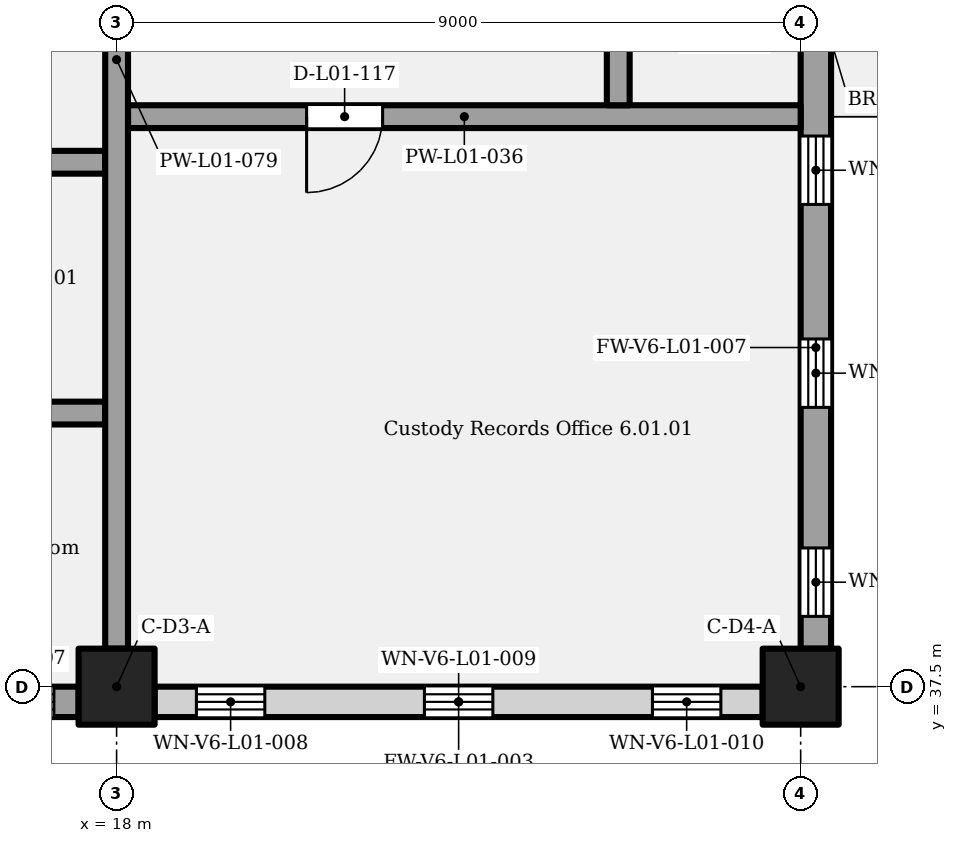
"""IFC4 building model, lengths in metres.
Left out: names, types, materials, properties, quantities, classifications, styles, units other than length and angle.
Written with IfcOpenShell. Run it as: python <this file> out.ifc"""

import sys

from ifc_helpers import new_model, si_unit, direction, frame, frame_2d, origin, origin_2d, place, context, subcontext, project, spatial, rectangle, extrude, element, fill, save


model = new_model("IFC4")
c1 = context("Model", 3, precision=1e-05, world=origin(), true_north=direction((0.0, 1.0)))
c2 = subcontext(c1, "Body", "Model", "MODEL_VIEW")
j1 = project(units=[si_unit("LENGTHUNIT", "METRE"), si_unit("PLANEANGLEUNIT", "RADIAN")], contexts=[c1])
p1 = place(None, origin())
s1 = spatial("IfcSite", under=j1, at=p1, CompositionType="ELEMENT")
p2 = place(p1, origin())
s2 = spatial("IfcBuilding", under=s1, at=p2, CompositionType="ELEMENT")
p3 = place(p2, frame((0.0, 0.0, 6.6)))
s3 = spatial("IfcBuildingStorey", under=s2, at=p3, CompositionType="ELEMENT", Elevation=6.6)
for number, where, z_axis, x_axis in (
    (1, (18.0, 37.5, 0.0), (0.0, 0.0, 1.0), (1.0, 0.0, 0.0)),
    (2, (27.0, 37.5, 0.0), (0.0, 0.0, 1.0), (1.0, 0.0, 0.0)),
):
    element("IfcColumn", number, at=place(p3, frame(where, z_axis=z_axis, x_axis=x_axis)), inside=s3, PredefinedType="COLUMN", context=c2, shape_type="SweptSolid", body=[
        extrude(rectangle(XDim=1.0, YDim=1.0, at=origin_2d()), origin(), (0.0, 0.0, 1.0), 5.4),
    ])
p4 = place(p3, frame((9.5, 37.3, 0.0), z_axis=(0.0, 0.0, 1.0), x_axis=(1.0, 0.0, 0.0)))
e3 = element("IfcWall", 3, at=p4, inside=s3, PredefinedType="SOLIDWALL", context=c2, shape_type="SweptSolid", body=[
    extrude(rectangle(XDim=8.0, YDim=0.4, at=frame_2d((4.0, 0.0))), origin(), (0.0, 0.0, 1.0), 5.1),
])
p5 = place(p4, frame((0.325, 0.0, 1.5)))
e4 = element("IfcOpeningElement", 4, at=p5, cuts=e3, PredefinedType="OPENING", context=c2, shape_type="SweptSolid", body=[
    extrude(rectangle(XDim=0.6, YDim=3.0, at=frame_2d((0.3, 1.5))), frame((0.0, 0.21, 0.0), z_axis=(0.0, -1.0, 0.0), x_axis=(1.0, 0.0, 0.0)), (0.0, 0.0, 1.0), 0.42),
])
p6 = place(p4, frame((2.575, 0.0, 1.5)))
e5 = element("IfcOpeningElement", 5, at=p6, cuts=e3, PredefinedType="OPENING", context=c2, shape_type="SweptSolid", body=[
    extrude(rectangle(XDim=0.6, YDim=3.0, at=frame_2d((0.3, 1.5))), frame((0.0, 0.21, 0.0), z_axis=(0.0, -1.0, 0.0), x_axis=(1.0, 0.0, 0.0)), (0.0, 0.0, 1.0), 0.42),
])
p7 = place(p4, frame((4.825, 0.0, 1.5)))
e6 = element("IfcOpeningElement", 6, at=p7, cuts=e3, PredefinedType="OPENING", context=c2, shape_type="SweptSolid", body=[
    extrude(rectangle(XDim=0.6, YDim=3.0, at=frame_2d((0.3, 1.5))), frame((0.0, 0.21, 0.0), z_axis=(0.0, -1.0, 0.0), x_axis=(1.0, 0.0, 0.0)), (0.0, 0.0, 1.0), 0.42),
])
p8 = place(p4, frame((7.075, 0.0, 1.5)))
e7 = element("IfcOpeningElement", 7, at=p8, cuts=e3, PredefinedType="OPENING", context=c2, shape_type="SweptSolid", body=[
    extrude(rectangle(XDim=0.6, YDim=3.0, at=frame_2d((0.3, 1.5))), frame((0.0, 0.21, 0.0), z_axis=(0.0, -1.0, 0.0), x_axis=(1.0, 0.0, 0.0)), (0.0, 0.0, 1.0), 0.42),
])
p9 = place(p3, frame((18.5, 37.3, 0.0), z_axis=(0.0, 0.0, 1.0), x_axis=(1.0, 0.0, 0.0)))
e8 = element("IfcWall", 8, at=p9, inside=s3, PredefinedType="SOLIDWALL", context=c2, shape_type="SweptSolid", body=[
    extrude(rectangle(XDim=8.0, YDim=0.4, at=frame_2d((4.0, 0.0))), origin(), (0.0, 0.0, 1.0), 5.1),
])
p10 = place(p9, frame((0.55, 0.0, 1.5)))
e9 = element("IfcOpeningElement", 9, at=p10, cuts=e8, PredefinedType="OPENING", context=c2, shape_type="SweptSolid", body=[
    extrude(rectangle(XDim=0.9, YDim=1.8, at=frame_2d((0.45, 0.9))), frame((0.0, 0.21, 0.0), z_axis=(0.0, -1.0, 0.0), x_axis=(1.0, 0.0, 0.0)), (0.0, 0.0, 1.0), 0.42),
])
p11 = place(p9, frame((3.55, 0.0, 1.5)))
e10 = element("IfcOpeningElement", 10, at=p11, cuts=e8, PredefinedType="OPENING", context=c2, shape_type="SweptSolid", body=[
    extrude(rectangle(XDim=0.9, YDim=1.8, at=frame_2d((0.45, 0.9))), frame((0.0, 0.21, 0.0), z_axis=(0.0, -1.0, 0.0), x_axis=(1.0, 0.0, 0.0)), (0.0, 0.0, 1.0), 0.42),
])
p12 = place(p9, frame((6.55, 0.0, 1.5)))
e11 = element("IfcOpeningElement", 11, at=p12, cuts=e8, PredefinedType="OPENING", context=c2, shape_type="SweptSolid", body=[
    extrude(rectangle(XDim=0.9, YDim=1.8, at=frame_2d((0.45, 0.9))), frame((0.0, 0.21, 0.0), z_axis=(0.0, -1.0, 0.0), x_axis=(1.0, 0.0, 0.0)), (0.0, 0.0, 1.0), 0.42),
])
p13 = place(p3, frame((27.2, 38.0, 0.0), z_axis=(0.0, 0.0, 1.0), x_axis=(0.0, 1.0, 0.0)))
e12 = element("IfcWall", 12, at=p13, inside=s3, PredefinedType="SOLIDWALL", context=c2, shape_type="SweptSolid", body=[
    extrude(rectangle(XDim=7.925, YDim=0.4, at=frame_2d((3.962, 0.0))), origin(), (0.0, 0.0, 1.0), 5.1),
])
p14 = place(p13, frame((0.425, 0.0, 1.5)))
e13 = element("IfcOpeningElement", 13, at=p14, cuts=e12, PredefinedType="OPENING", context=c2, shape_type="SweptSolid", body=[
    extrude(rectangle(XDim=0.9, YDim=1.8, at=frame_2d((0.45, 0.9))), frame((0.0, 0.21, 0.0), z_axis=(0.0, -1.0, 0.0), x_axis=(1.0, 0.0, 0.0)), (0.0, 0.0, 1.0), 0.42),
])
p15 = place(p13, frame((3.175, 0.0, 1.5)))
e14 = element("IfcOpeningElement", 14, at=p15, cuts=e12, PredefinedType="OPENING", context=c2, shape_type="SweptSolid", body=[
    extrude(rectangle(XDim=0.9, YDim=1.8, at=frame_2d((0.45, 0.9))), frame((0.0, 0.21, 0.0), z_axis=(0.0, -1.0, 0.0), x_axis=(1.0, 0.0, 0.0)), (0.0, 0.0, 1.0), 0.42),
])
p16 = place(p13, frame((5.845, 0.0, 1.5)))
e15 = element("IfcOpeningElement", 15, at=p16, cuts=e12, PredefinedType="OPENING", context=c2, shape_type="SweptSolid", body=[
    extrude(rectangle(XDim=0.9, YDim=1.8, at=frame_2d((0.45, 0.9))), frame((0.0, 0.21, 0.0), z_axis=(0.0, -1.0, 0.0), x_axis=(1.0, 0.0, 0.0)), (0.0, 0.0, 1.0), 0.42),
])
p17 = place(p3, frame((9.0, 41.1, 0.0), z_axis=(0.0, 0.0, 1.0), x_axis=(1.0, 0.0, 0.0)))
e16 = element("IfcWall", 16, at=p17, inside=s3, PredefinedType="PARTITIONING", context=c2, shape_type="SweptSolid", body=[
    extrude(rectangle(XDim=8.85, YDim=0.3, at=frame_2d((4.425, 0.0))), origin(), (0.0, 0.0, 1.0), 5.1),
])
p18 = place(p17, frame((1.7, 0.0, 0.0), z_axis=(0.0, 0.0, 1.0), x_axis=(-1.0, 0.0, 0.0)))
e17 = element("IfcOpeningElement", 17, at=p18, cuts=e16, PredefinedType="OPENING", context=c2, shape_type="SweptSolid", body=[
    extrude(rectangle(XDim=1.0, YDim=2.1, at=frame_2d((0.5, 1.05))), frame((0.0, 0.16, 0.0), z_axis=(0.0, -1.0, 0.0), x_axis=(1.0, 0.0, 0.0)), (0.0, 0.0, 1.0), 0.32),
])
p19 = place(p3, frame((11.55, 44.4, 0.0), z_axis=(0.0, 0.0, 1.0), x_axis=(1.0, 0.0, 0.0)))
e18 = element("IfcWall", 18, at=p19, inside=s3, PredefinedType="PARTITIONING", context=c2, shape_type="SweptSolid", body=[
    extrude(rectangle(XDim=6.3, YDim=0.3, at=frame_2d((3.15, 0.0))), origin(), (0.0, 0.0, 1.0), 5.1),
])
p20 = place(p3, frame((18.15, 45.0, 0.0), z_axis=(0.0, 0.0, 1.0), x_axis=(1.0, 0.0, 0.0)))
e19 = element("IfcWall", 19, at=p20, inside=s3, PredefinedType="PARTITIONING", context=c2, shape_type="SweptSolid", body=[
    extrude(rectangle(XDim=8.85, YDim=0.3, at=frame_2d((4.425, 0.0))), origin(), (0.0, 0.0, 1.0), 5.1),
])
p21 = place(p20, frame((3.35, 0.0, 0.0), z_axis=(0.0, 0.0, 1.0), x_axis=(-1.0, 0.0, 0.0)))
e20 = element("IfcOpeningElement", 20, at=p21, cuts=e19, PredefinedType="OPENING", context=c2, shape_type="SweptSolid", body=[
    extrude(rectangle(XDim=1.0, YDim=2.1, at=frame_2d((0.5, 1.05))), frame((0.0, 0.16, 0.0), z_axis=(0.0, -1.0, 0.0), x_axis=(1.0, 0.0, 0.0)), (0.0, 0.0, 1.0), 0.32),
])
p22 = place(p3, frame((18.0, 38.0, 0.0), z_axis=(0.0, 0.0, 1.0), x_axis=(0.0, 1.0, 0.0)))
e21 = element("IfcWall", 21, at=p22, inside=s3, PredefinedType="PARTITIONING", context=c2, shape_type="SweptSolid", body=[
    extrude(rectangle(XDim=15.5, YDim=0.3, at=frame_2d((7.75, 0.0))), origin(), (0.0, 0.0, 1.0), 4.15),
])
p23 = place(p3, frame((24.6, 45.15, 0.0), z_axis=(0.0, 0.0, 1.0), x_axis=(0.0, 1.0, 0.0)))
e22 = element("IfcWall", 22, at=p23, inside=s3, PredefinedType="PARTITIONING", context=c2, shape_type="SweptSolid", body=[
    extrude(rectangle(XDim=9.3, YDim=0.3, at=frame_2d((4.65, 0.0))), origin(), (0.0, 0.0, 1.0), 5.1),
])
p24 = place(p8, origin())
e23 = element("IfcWindow", 23, at=p24, inside=s3, PartitioningType="SINGLE_PANEL", PredefinedType="WINDOW", context=c2, shape_type="SweptSolid", body=[
    extrude(rectangle(XDim=0.6, YDim=3.0, at=frame_2d((0.3, 1.5))), frame((0.0, 0.03, 0.0), z_axis=(0.0, -1.0, 0.0), x_axis=(1.0, 0.0, 0.0)), (0.0, 0.0, 1.0), 0.06),
])
fill(e7, e23)
p25 = place(p10, origin())
e24 = element("IfcWindow", 24, at=p25, inside=s3, PartitioningType="SINGLE_PANEL", PredefinedType="WINDOW", context=c2, shape_type="SweptSolid", body=[
    extrude(rectangle(XDim=0.9, YDim=1.8, at=frame_2d((0.45, 0.9))), frame((0.0, 0.03, 0.0), z_axis=(0.0, -1.0, 0.0), x_axis=(1.0, 0.0, 0.0)), (0.0, 0.0, 1.0), 0.06),
])
fill(e9, e24)
p26 = place(p11, origin())
e25 = element("IfcWindow", 25, at=p26, inside=s3, PartitioningType="SINGLE_PANEL", PredefinedType="WINDOW", context=c2, shape_type="SweptSolid", body=[
    extrude(rectangle(XDim=0.9, YDim=1.8, at=frame_2d((0.45, 0.9))), frame((0.0, 0.03, 0.0), z_axis=(0.0, -1.0, 0.0), x_axis=(1.0, 0.0, 0.0)), (0.0, 0.0, 1.0), 0.06),
])
fill(e10, e25)
p27 = place(p12, origin())
e26 = element("IfcWindow", 26, at=p27, inside=s3, PartitioningType="SINGLE_PANEL", PredefinedType="WINDOW", context=c2, shape_type="SweptSolid", body=[
    extrude(rectangle(XDim=0.9, YDim=1.8, at=frame_2d((0.45, 0.9))), frame((0.0, 0.03, 0.0), z_axis=(0.0, -1.0, 0.0), x_axis=(1.0, 0.0, 0.0)), (0.0, 0.0, 1.0), 0.06),
])
fill(e11, e26)
p28 = place(p14, origin())
e27 = element("IfcWindow", 27, at=p28, inside=s3, PartitioningType="SINGLE_PANEL", PredefinedType="WINDOW", context=c2, shape_type="SweptSolid", body=[
    extrude(rectangle(XDim=0.9, YDim=1.8, at=frame_2d((0.45, 0.9))), frame((0.0, 0.03, 0.0), z_axis=(0.0, -1.0, 0.0), x_axis=(1.0, 0.0, 0.0)), (0.0, 0.0, 1.0), 0.06),
])
fill(e13, e27)
p29 = place(p15, origin())
e28 = element("IfcWindow", 28, at=p29, inside=s3, PartitioningType="SINGLE_PANEL", PredefinedType="WINDOW", context=c2, shape_type="SweptSolid", body=[
    extrude(rectangle(XDim=0.9, YDim=1.8, at=frame_2d((0.45, 0.9))), frame((0.0, 0.03, 0.0), z_axis=(0.0, -1.0, 0.0), x_axis=(1.0, 0.0, 0.0)), (0.0, 0.0, 1.0), 0.06),
])
fill(e14, e28)
p30 = place(p16, origin())
e29 = element("IfcWindow", 29, at=p30, inside=s3, PartitioningType="SINGLE_PANEL", PredefinedType="WINDOW", context=c2, shape_type="SweptSolid", body=[
    extrude(rectangle(XDim=0.9, YDim=1.8, at=frame_2d((0.45, 0.9))), frame((0.0, 0.03, 0.0), z_axis=(0.0, -1.0, 0.0), x_axis=(1.0, 0.0, 0.0)), (0.0, 0.0, 1.0), 0.06),
])
fill(e15, e29)
p31 = place(p21, origin())
e30 = element("IfcDoor", 30, at=p31, inside=s3, OperationType="SINGLE_SWING_RIGHT", PredefinedType="DOOR", context=c2, shape_type="SweptSolid", body=[
    extrude(rectangle(XDim=1.0, YDim=2.1, at=frame_2d((0.5, 1.05))), frame((0.0, 0.025, 0.0), z_axis=(0.0, -1.0, 0.0), x_axis=(1.0, 0.0, 0.0)), (0.0, 0.0, 1.0), 0.05),
])
fill(e20, e30)
save(model, sys.argv[1])
